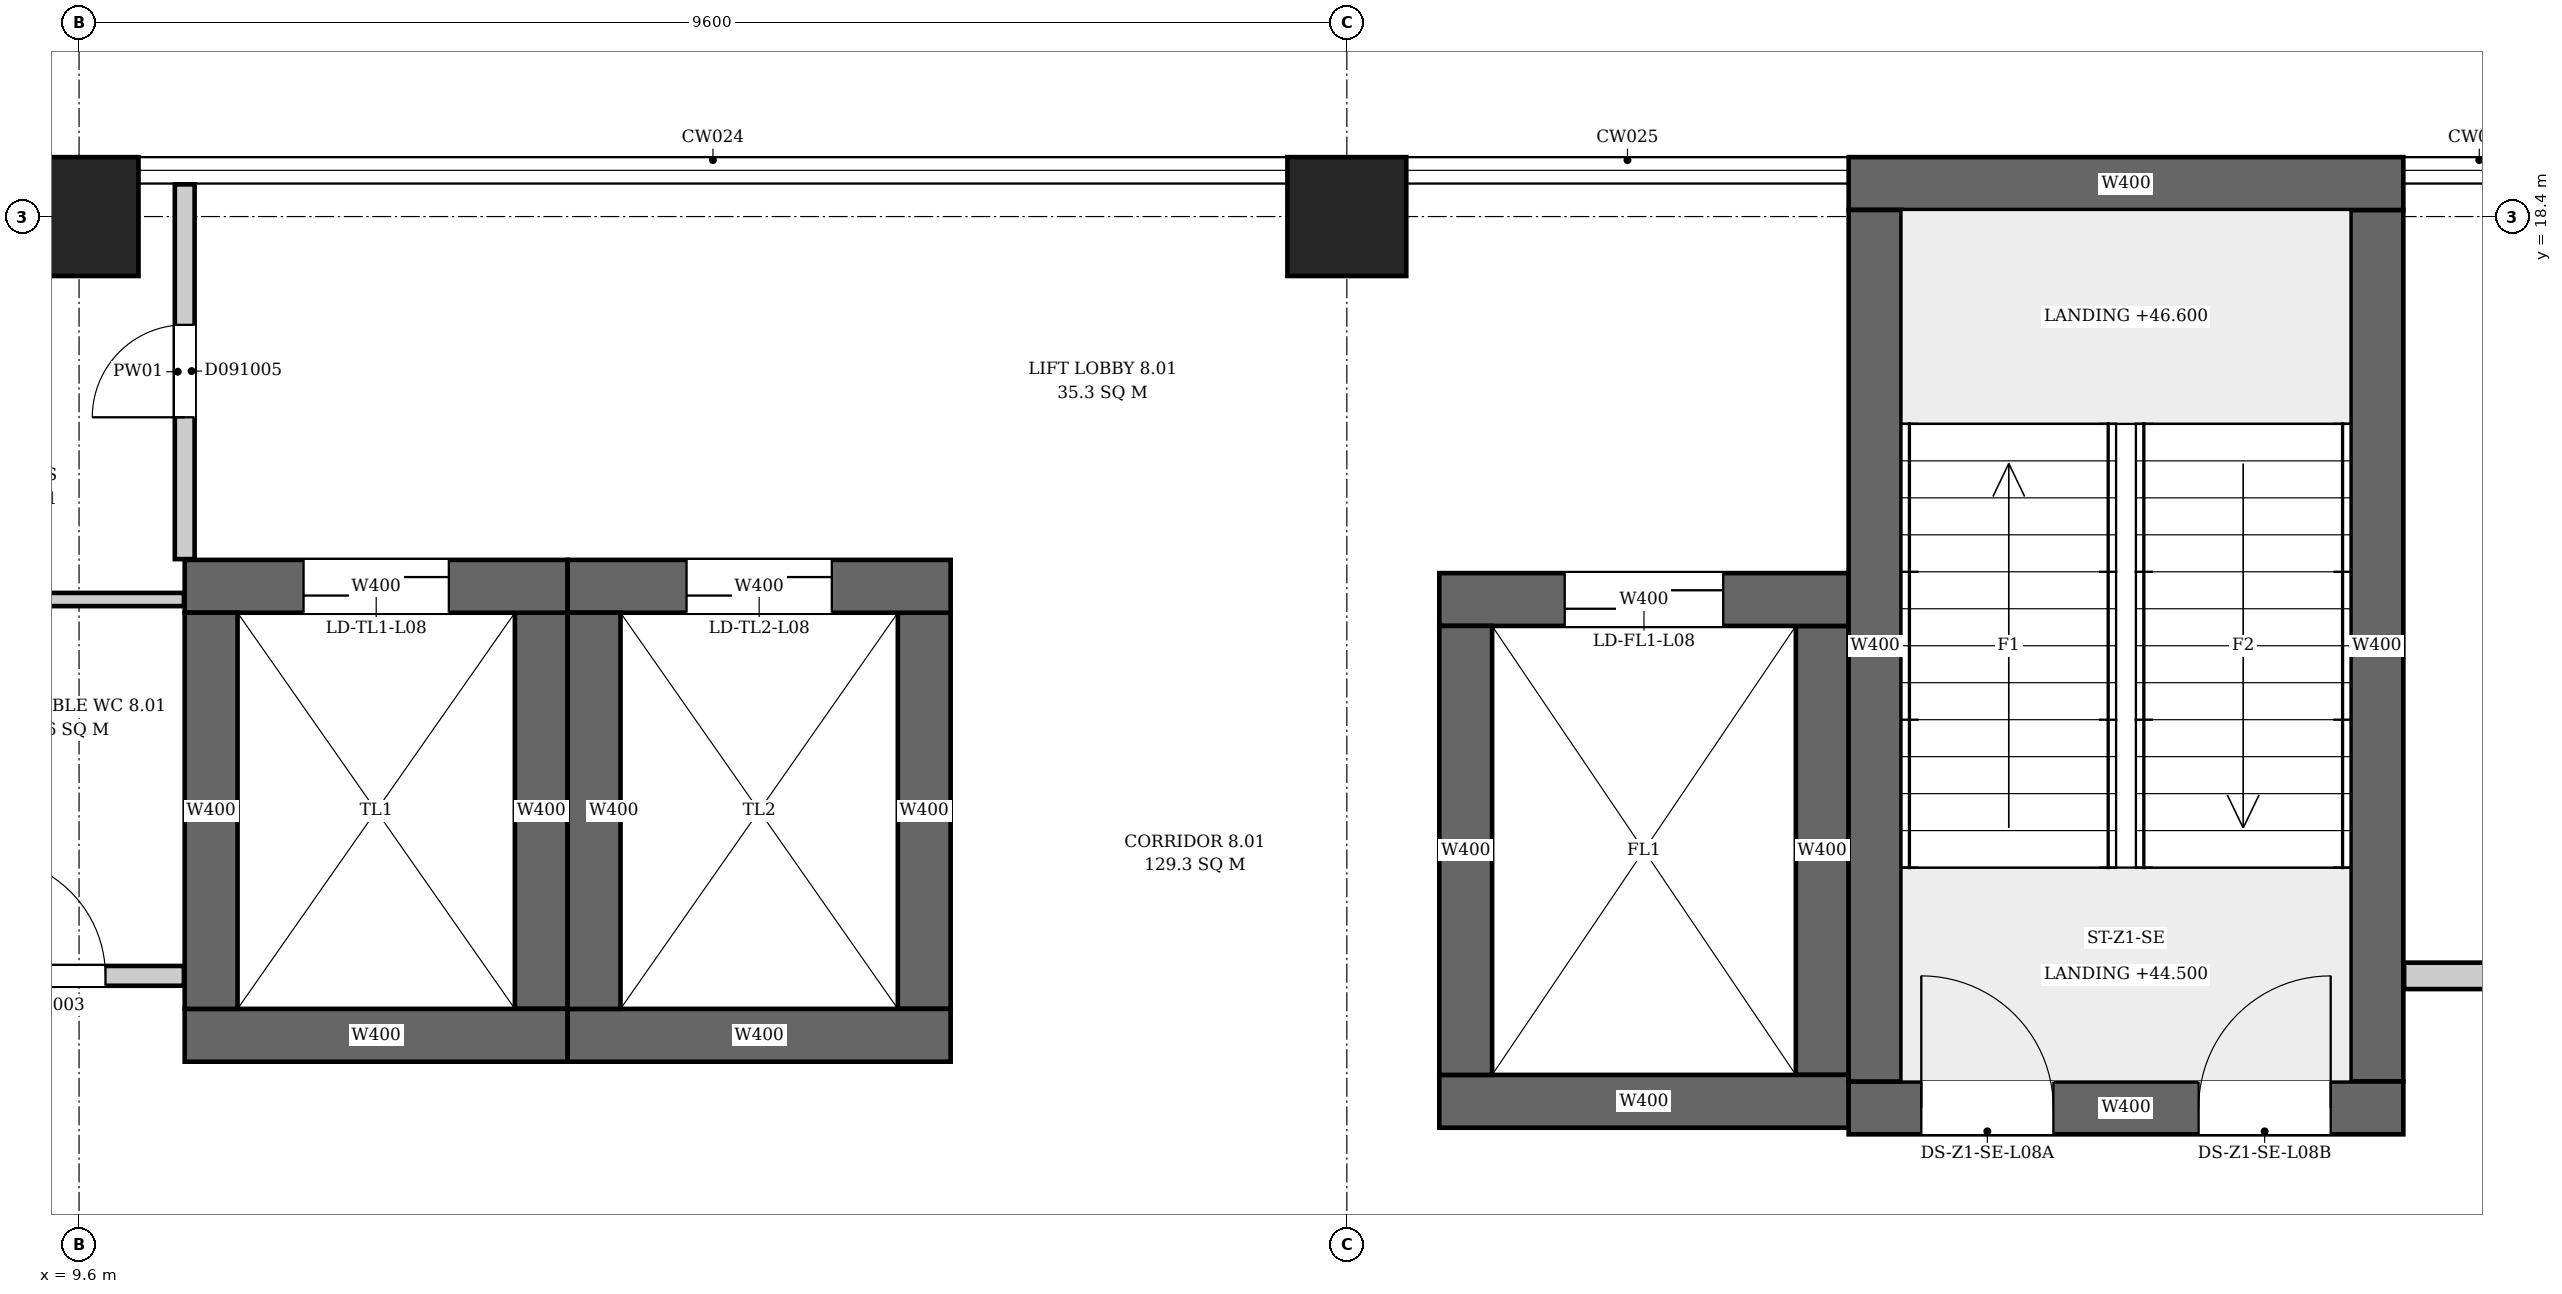
"""IFC4 building model, lengths in metres.
Left out: names, types, materials, properties, quantities, classifications, styles, units other than length and angle.
Written with IfcOpenShell. Run it as: python <this file> out.ifc"""

import sys

from ifc_helpers import new_model, si_unit, direction, frame, frame_2d, origin, origin_2d, place, context, subcontext, project, spatial, rectangle, extrude, element, fill, save


model = new_model("IFC4")
c1 = context("Model", 3, precision=1e-05, world=origin(), true_north=direction((0.0, 1.0)))
c2 = subcontext(c1, "Body", "Model", "MODEL_VIEW")
j1 = project(units=[si_unit("LENGTHUNIT", "METRE"), si_unit("PLANEANGLEUNIT", "RADIAN")], contexts=[c1])
p1 = place(None, origin())
s1 = spatial("IfcSite", under=j1, at=p1, CompositionType="ELEMENT")
p2 = place(p1, origin())
s2 = spatial("IfcBuilding", under=s1, at=p2, CompositionType="ELEMENT")
p3 = place(p2, frame((0.0, 0.0, 44.5)))
s3 = spatial("IfcBuildingStorey", under=s2, at=p3, CompositionType="ELEMENT", Elevation=44.5)
p4 = place(p3, frame((23.0, 11.65, 0.0), z_axis=(0.0, 0.0, 1.0), x_axis=(1.0, 0.0, 0.0)))
e1 = element("IfcWall", 1, at=p4, inside=s3, PredefinedType="SHEAR", context=c2, shape_type="SweptSolid", body=[
    extrude(rectangle(XDim=4.2, YDim=0.4, at=frame_2d((2.1, 0.0))), origin(), (0.0, 0.0, 1.0), 4.2),
])
p5 = place(p4, frame((0.55, 0.0, 0.0)))
e2 = element("IfcOpeningElement", 2, at=p5, cuts=e1, PredefinedType="OPENING", context=c2, shape_type="SweptSolid", body=[
    extrude(rectangle(XDim=1.0, YDim=2.1, at=frame_2d((0.5, 1.05))), frame((0.0, 0.21, 0.0), z_axis=(0.0, -1.0, 0.0), x_axis=(1.0, 0.0, 0.0)), (0.0, 0.0, 1.0), 0.42),
])
p6 = place(p4, frame((2.65, 0.0, 0.0)))
e3 = element("IfcOpeningElement", 3, at=p6, cuts=e1, PredefinedType="OPENING", context=c2, shape_type="SweptSolid", body=[
    extrude(rectangle(XDim=1.0, YDim=2.1, at=frame_2d((0.5, 1.05))), frame((0.0, 0.21, 0.0), z_axis=(0.0, -1.0, 0.0), x_axis=(1.0, 0.0, 0.0)), (0.0, 0.0, 1.0), 0.42),
])
p7 = place(p3, frame((23.0, 18.65, 0.0), z_axis=(0.0, 0.0, 1.0), x_axis=(1.0, 0.0, 0.0)))
e4 = element("IfcWall", 4, at=p7, inside=s3, PredefinedType="SHEAR", context=c2, shape_type="SweptSolid", body=[
    extrude(rectangle(XDim=4.2, YDim=0.4, at=frame_2d((2.1, 0.0))), origin(), (0.0, 0.0, 1.0), 4.2),
])
for number, where, z_axis, x_axis in (
    (5, (23.2, 11.85, 0.0), (0.0, 0.0, 1.0), (0.0, 1.0, 0.0)),
    (6, (27.0, 11.85, 0.0), (0.0, 0.0, 1.0), (0.0, 1.0, 0.0)),
):
    element("IfcWall", number, at=place(p3, frame(where, z_axis=z_axis, x_axis=x_axis)), inside=s3, PredefinedType="SHEAR", context=c2, shape_type="SweptSolid", body=[
        extrude(rectangle(XDim=6.6, YDim=0.4, at=frame_2d((3.3, 0.0))), origin(), (0.0, 0.0, 1.0), 4.2),
    ])
p8 = place(p3, frame((10.4, 12.2, 0.0), z_axis=(0.0, 0.0, 1.0), x_axis=(1.0, 0.0, 0.0)))
e7 = element("IfcWall", 7, at=p8, inside=s3, PredefinedType="SHEAR", context=c2, shape_type="SweptSolid", body=[
    extrude(rectangle(XDim=2.9, YDim=0.4, at=frame_2d((1.45, 0.0))), origin(), (0.0, 0.0, 1.0), 4.2),
])
p9 = place(p3, frame((10.4, 15.6, 0.0), z_axis=(0.0, 0.0, 1.0), x_axis=(1.0, 0.0, 0.0)))
e8 = element("IfcWall", 8, at=p9, inside=s3, PredefinedType="SHEAR", context=c2, shape_type="SweptSolid", body=[
    extrude(rectangle(XDim=2.9, YDim=0.4, at=frame_2d((1.45, 0.0))), origin(), (0.0, 0.0, 1.0), 4.2),
])
p10 = place(p9, frame((0.9, 0.0, 0.0)))
e9 = element("IfcOpeningElement", 9, at=p10, cuts=e8, PredefinedType="OPENING", context=c2, shape_type="SweptSolid", body=[
    extrude(rectangle(XDim=1.1, YDim=2.1, at=frame_2d((0.55, 1.05))), frame((0.0, 0.21, 0.0), z_axis=(0.0, -1.0, 0.0), x_axis=(1.0, 0.0, 0.0)), (0.0, 0.0, 1.0), 0.42),
])
for number, where, z_axis, x_axis in (
    (10, (10.6, 12.4, 0.0), (0.0, 0.0, 1.0), (0.0, 1.0, 0.0)),
    (11, (13.1, 12.4, 0.0), (0.0, 0.0, 1.0), (0.0, 1.0, 0.0)),
):
    element("IfcWall", number, at=place(p3, frame(where, z_axis=z_axis, x_axis=x_axis)), inside=s3, PredefinedType="SHEAR", context=c2, shape_type="SweptSolid", body=[
        extrude(rectangle(XDim=3.0, YDim=0.4, at=frame_2d((1.5, 0.0))), origin(), (0.0, 0.0, 1.0), 4.2),
    ])
p11 = place(p3, frame((13.3, 12.2, 0.0), z_axis=(0.0, 0.0, 1.0), x_axis=(1.0, 0.0, 0.0)))
e12 = element("IfcWall", 12, at=p11, inside=s3, PredefinedType="SHEAR", context=c2, shape_type="SweptSolid", body=[
    extrude(rectangle(XDim=2.9, YDim=0.4, at=frame_2d((1.45, 0.0))), origin(), (0.0, 0.0, 1.0), 4.2),
])
p12 = place(p3, frame((13.3, 15.6, 0.0), z_axis=(0.0, 0.0, 1.0), x_axis=(1.0, 0.0, 0.0)))
e13 = element("IfcWall", 13, at=p12, inside=s3, PredefinedType="SHEAR", context=c2, shape_type="SweptSolid", body=[
    extrude(rectangle(XDim=2.9, YDim=0.4, at=frame_2d((1.45, 0.0))), origin(), (0.0, 0.0, 1.0), 4.2),
])
p13 = place(p12, frame((0.9, 0.0, 0.0)))
e14 = element("IfcOpeningElement", 14, at=p13, cuts=e13, PredefinedType="OPENING", context=c2, shape_type="SweptSolid", body=[
    extrude(rectangle(XDim=1.1, YDim=2.1, at=frame_2d((0.55, 1.05))), frame((0.0, 0.21, 0.0), z_axis=(0.0, -1.0, 0.0), x_axis=(1.0, 0.0, 0.0)), (0.0, 0.0, 1.0), 0.42),
])
for number, where, z_axis, x_axis in (
    (15, (13.5, 12.4, 0.0), (0.0, 0.0, 1.0), (0.0, 1.0, 0.0)),
    (16, (16.0, 12.4, 0.0), (0.0, 0.0, 1.0), (0.0, 1.0, 0.0)),
):
    element("IfcWall", number, at=place(p3, frame(where, z_axis=z_axis, x_axis=x_axis)), inside=s3, PredefinedType="SHEAR", context=c2, shape_type="SweptSolid", body=[
        extrude(rectangle(XDim=3.0, YDim=0.4, at=frame_2d((1.5, 0.0))), origin(), (0.0, 0.0, 1.0), 4.2),
    ])
p14 = place(p3, frame((19.9, 11.7, 0.0), z_axis=(0.0, 0.0, 1.0), x_axis=(1.0, 0.0, 0.0)))
e17 = element("IfcWall", 17, at=p14, inside=s3, PredefinedType="SHEAR", context=c2, shape_type="SweptSolid", body=[
    extrude(rectangle(XDim=3.1, YDim=0.4, at=frame_2d((1.55, 0.0))), origin(), (0.0, 0.0, 1.0), 4.2),
])
p15 = place(p3, frame((19.9, 15.5, 0.0), z_axis=(0.0, 0.0, 1.0), x_axis=(1.0, 0.0, 0.0)))
e18 = element("IfcWall", 18, at=p15, inside=s3, PredefinedType="SHEAR", context=c2, shape_type="SweptSolid", body=[
    extrude(rectangle(XDim=3.1, YDim=0.4, at=frame_2d((1.55, 0.0))), origin(), (0.0, 0.0, 1.0), 4.2),
])
p16 = place(p15, frame((0.95, 0.0, 0.0)))
e19 = element("IfcOpeningElement", 19, at=p16, cuts=e18, PredefinedType="OPENING", context=c2, shape_type="SweptSolid", body=[
    extrude(rectangle(XDim=1.2, YDim=2.1, at=frame_2d((0.6, 1.05))), frame((0.0, 0.21, 0.0), z_axis=(0.0, -1.0, 0.0), x_axis=(1.0, 0.0, 0.0)), (0.0, 0.0, 1.0), 0.42),
])
for number, where, z_axis, x_axis in (
    (20, (20.1, 11.9, 0.0), (0.0, 0.0, 1.0), (0.0, 1.0, 0.0)),
    (21, (22.8, 11.9, 0.0), (0.0, 0.0, 1.0), (0.0, 1.0, 0.0)),
):
    element("IfcWall", number, at=place(p3, frame(where, z_axis=z_axis, x_axis=x_axis)), inside=s3, PredefinedType="SHEAR", context=c2, shape_type="SweptSolid", body=[
        extrude(rectangle(XDim=3.4, YDim=0.4, at=frame_2d((1.7, 0.0))), origin(), (0.0, 0.0, 1.0), 4.2),
    ])
for number, where, z_axis, x_axis in (
    (22, (9.6, 18.4, 0.0), (0.0, 0.0, 1.0), (1.0, 0.0, 0.0)),
    (23, (19.2, 18.4, 0.0), (0.0, 0.0, 1.0), (1.0, 0.0, 0.0)),
):
    element("IfcColumn", number, at=place(p3, frame(where, z_axis=z_axis, x_axis=x_axis)), inside=s3, PredefinedType="COLUMN", context=c2, shape_type="SweptSolid", body=[
        extrude(rectangle(XDim=0.9, YDim=0.9, at=origin_2d()), origin(), (0.0, 0.0, 1.0), 4.2),
    ])
p17 = place(p3, frame((6.125, 12.65, 0.0), z_axis=(0.0, 0.0, 1.0), x_axis=(1.0, 0.0, 0.0)))
e24 = element("IfcWall", 24, at=p17, inside=s3, PredefinedType="PARTITIONING", context=c2, shape_type="SweptSolid", body=[
    extrude(rectangle(XDim=4.269, YDim=0.15, at=frame_2d((2.135, 0.0))), origin(), (0.0, 0.0, 1.0), 3.9),
])
p18 = place(p17, frame((2.775, 0.0, 0.0)))
e25 = element("IfcOpeningElement", 25, at=p18, cuts=e24, PredefinedType="OPENING", context=c2, shape_type="SweptSolid", body=[
    extrude(rectangle(XDim=0.9, YDim=2.1, at=frame_2d((0.45, 1.05))), frame((0.0, 0.085, 0.0), z_axis=(0.0, -1.0, 0.0), x_axis=(1.0, 0.0, 0.0)), (0.0, 0.0, 1.0), 0.17),
])
p19 = place(p3, frame((6.275, 15.5, 0.0), z_axis=(0.0, 0.0, 1.0), x_axis=(1.0, 0.0, 0.0)))
e26 = element("IfcWall", 26, at=p19, inside=s3, PredefinedType="PARTITIONING", context=c2, shape_type="SweptSolid", body=[
    extrude(rectangle(XDim=4.119, YDim=0.1, at=frame_2d((2.06, 0.0))), origin(), (0.0, 0.0, 1.0), 3.9),
])
p20 = place(p3, frame((10.4, 15.806, 0.0), z_axis=(0.0, 0.0, 1.0), x_axis=(0.0, 1.0, 0.0)))
e27 = element("IfcWall", 27, at=p20, inside=s3, PredefinedType="PARTITIONING", context=c2, shape_type="SweptSolid", body=[
    extrude(rectangle(XDim=2.838, YDim=0.15, at=frame_2d((1.419, 0.0))), origin(), (0.0, 0.0, 1.0), 3.9),
])
p21 = place(p20, frame((1.074, 0.0, 0.0)))
e28 = element("IfcOpeningElement", 28, at=p21, cuts=e27, PredefinedType="OPENING", context=c2, shape_type="SweptSolid", body=[
    extrude(rectangle(XDim=0.7, YDim=2.1, at=frame_2d((0.35, 1.05))), frame((0.0, 0.085, 0.0), z_axis=(0.0, -1.0, 0.0), x_axis=(1.0, 0.0, 0.0)), (0.0, 0.0, 1.0), 0.17),
])
p22 = place(p3, frame((27.206, 12.65, 0.0), z_axis=(0.0, 0.0, 1.0), x_axis=(1.0, 0.0, 0.0)))
e29 = element("IfcWall", 29, at=p22, inside=s3, PredefinedType="PARTITIONING", context=c2, shape_type="SweptSolid", body=[
    extrude(rectangle(XDim=20.988, YDim=0.2, at=frame_2d((10.494, 0.0))), origin(), (0.0, 0.0, 1.0), 3.9),
])
p23 = place(p22, frame((2.444, 0.0, 0.0)))
e30 = element("IfcOpeningElement", 30, at=p23, cuts=e29, PredefinedType="OPENING", context=c2, shape_type="SweptSolid", body=[
    extrude(rectangle(XDim=1.5, YDim=2.1, at=frame_2d((0.75, 1.05))), frame((0.0, 0.11, 0.0), z_axis=(0.0, -1.0, 0.0), x_axis=(1.0, 0.0, 0.0)), (0.0, 0.0, 1.0), 0.22),
])
p24 = place(p22, frame((10.694, 0.0, 0.0)))
e31 = element("IfcOpeningElement", 31, at=p24, cuts=e29, PredefinedType="OPENING", context=c2, shape_type="SweptSolid", body=[
    extrude(rectangle(XDim=1.0, YDim=2.1, at=frame_2d((0.5, 1.05))), frame((0.0, 0.11, 0.0), z_axis=(0.0, -1.0, 0.0), x_axis=(1.0, 0.0, 0.0)), (0.0, 0.0, 1.0), 0.22),
])
p25 = place(p22, frame((18.044, 0.0, 0.0)))
e32 = element("IfcOpeningElement", 32, at=p25, cuts=e29, PredefinedType="OPENING", context=c2, shape_type="SweptSolid", body=[
    extrude(rectangle(XDim=0.9, YDim=2.1, at=frame_2d((0.45, 1.05))), frame((0.0, 0.11, 0.0), z_axis=(0.0, -1.0, 0.0), x_axis=(1.0, 0.0, 0.0)), (0.0, 0.0, 1.0), 0.22),
])
p26 = place(p5, origin())
e33 = element("IfcDoor", 33, at=p26, inside=s3, OperationType="SINGLE_SWING_RIGHT", PredefinedType="DOOR", context=c2, shape_type="SweptSolid", body=[
    extrude(rectangle(XDim=1.0, YDim=2.1, at=frame_2d((0.5, 1.05))), frame((0.0, 0.025, 0.0), z_axis=(0.0, -1.0, 0.0), x_axis=(1.0, 0.0, 0.0)), (0.0, 0.0, 1.0), 0.05),
])
fill(e2, e33)
p27 = place(p6, origin())
e34 = element("IfcDoor", 34, at=p27, inside=s3, OperationType="SINGLE_SWING_LEFT", PredefinedType="DOOR", context=c2, shape_type="SweptSolid", body=[
    extrude(rectangle(XDim=1.0, YDim=2.1, at=frame_2d((0.5, 1.05))), frame((0.0, 0.025, 0.0), z_axis=(0.0, -1.0, 0.0), x_axis=(1.0, 0.0, 0.0)), (0.0, 0.0, 1.0), 0.05),
])
fill(e3, e34)
p28 = place(p10, origin())
e35 = element("IfcDoor", 35, at=p28, inside=s3, OperationType="DOUBLE_DOOR_SLIDING", PredefinedType="DOOR", context=c2, shape_type="SweptSolid", body=[
    extrude(rectangle(XDim=1.1, YDim=2.1, at=frame_2d((0.55, 1.05))), frame((0.0, 0.025, 0.0), z_axis=(0.0, -1.0, 0.0), x_axis=(1.0, 0.0, 0.0)), (0.0, 0.0, 1.0), 0.05),
])
fill(e9, e35)
p29 = place(p13, origin())
e36 = element("IfcDoor", 36, at=p29, inside=s3, OperationType="DOUBLE_DOOR_SLIDING", PredefinedType="DOOR", context=c2, shape_type="SweptSolid", body=[
    extrude(rectangle(XDim=1.1, YDim=2.1, at=frame_2d((0.55, 1.05))), frame((0.0, 0.025, 0.0), z_axis=(0.0, -1.0, 0.0), x_axis=(1.0, 0.0, 0.0)), (0.0, 0.0, 1.0), 0.05),
])
fill(e14, e36)
p30 = place(p16, origin())
e37 = element("IfcDoor", 37, at=p30, inside=s3, OperationType="DOUBLE_DOOR_SLIDING", PredefinedType="DOOR", context=c2, shape_type="SweptSolid", body=[
    extrude(rectangle(XDim=1.2, YDim=2.1, at=frame_2d((0.6, 1.05))), frame((0.0, 0.025, 0.0), z_axis=(0.0, -1.0, 0.0), x_axis=(1.0, 0.0, 0.0)), (0.0, 0.0, 1.0), 0.05),
])
fill(e19, e37)
p31 = place(p18, origin())
e38 = element("IfcDoor", 38, at=p31, inside=s3, OperationType="SINGLE_SWING_RIGHT", PredefinedType="DOOR", context=c2, shape_type="SweptSolid", body=[
    extrude(rectangle(XDim=0.9, YDim=2.1, at=frame_2d((0.45, 1.05))), frame((0.0, 0.025, 0.0), z_axis=(0.0, -1.0, 0.0), x_axis=(1.0, 0.0, 0.0)), (0.0, 0.0, 1.0), 0.05),
])
fill(e25, e38)
p32 = place(p21, origin())
e39 = element("IfcDoor", 39, at=p32, inside=s3, OperationType="SINGLE_SWING_LEFT", PredefinedType="DOOR", context=c2, shape_type="SweptSolid", body=[
    extrude(rectangle(XDim=0.7, YDim=2.1, at=frame_2d((0.35, 1.05))), frame((0.0, 0.025, 0.0), z_axis=(0.0, -1.0, 0.0), x_axis=(1.0, 0.0, 0.0)), (0.0, 0.0, 1.0), 0.05),
])
fill(e28, e39)
save(model, sys.argv[1])
